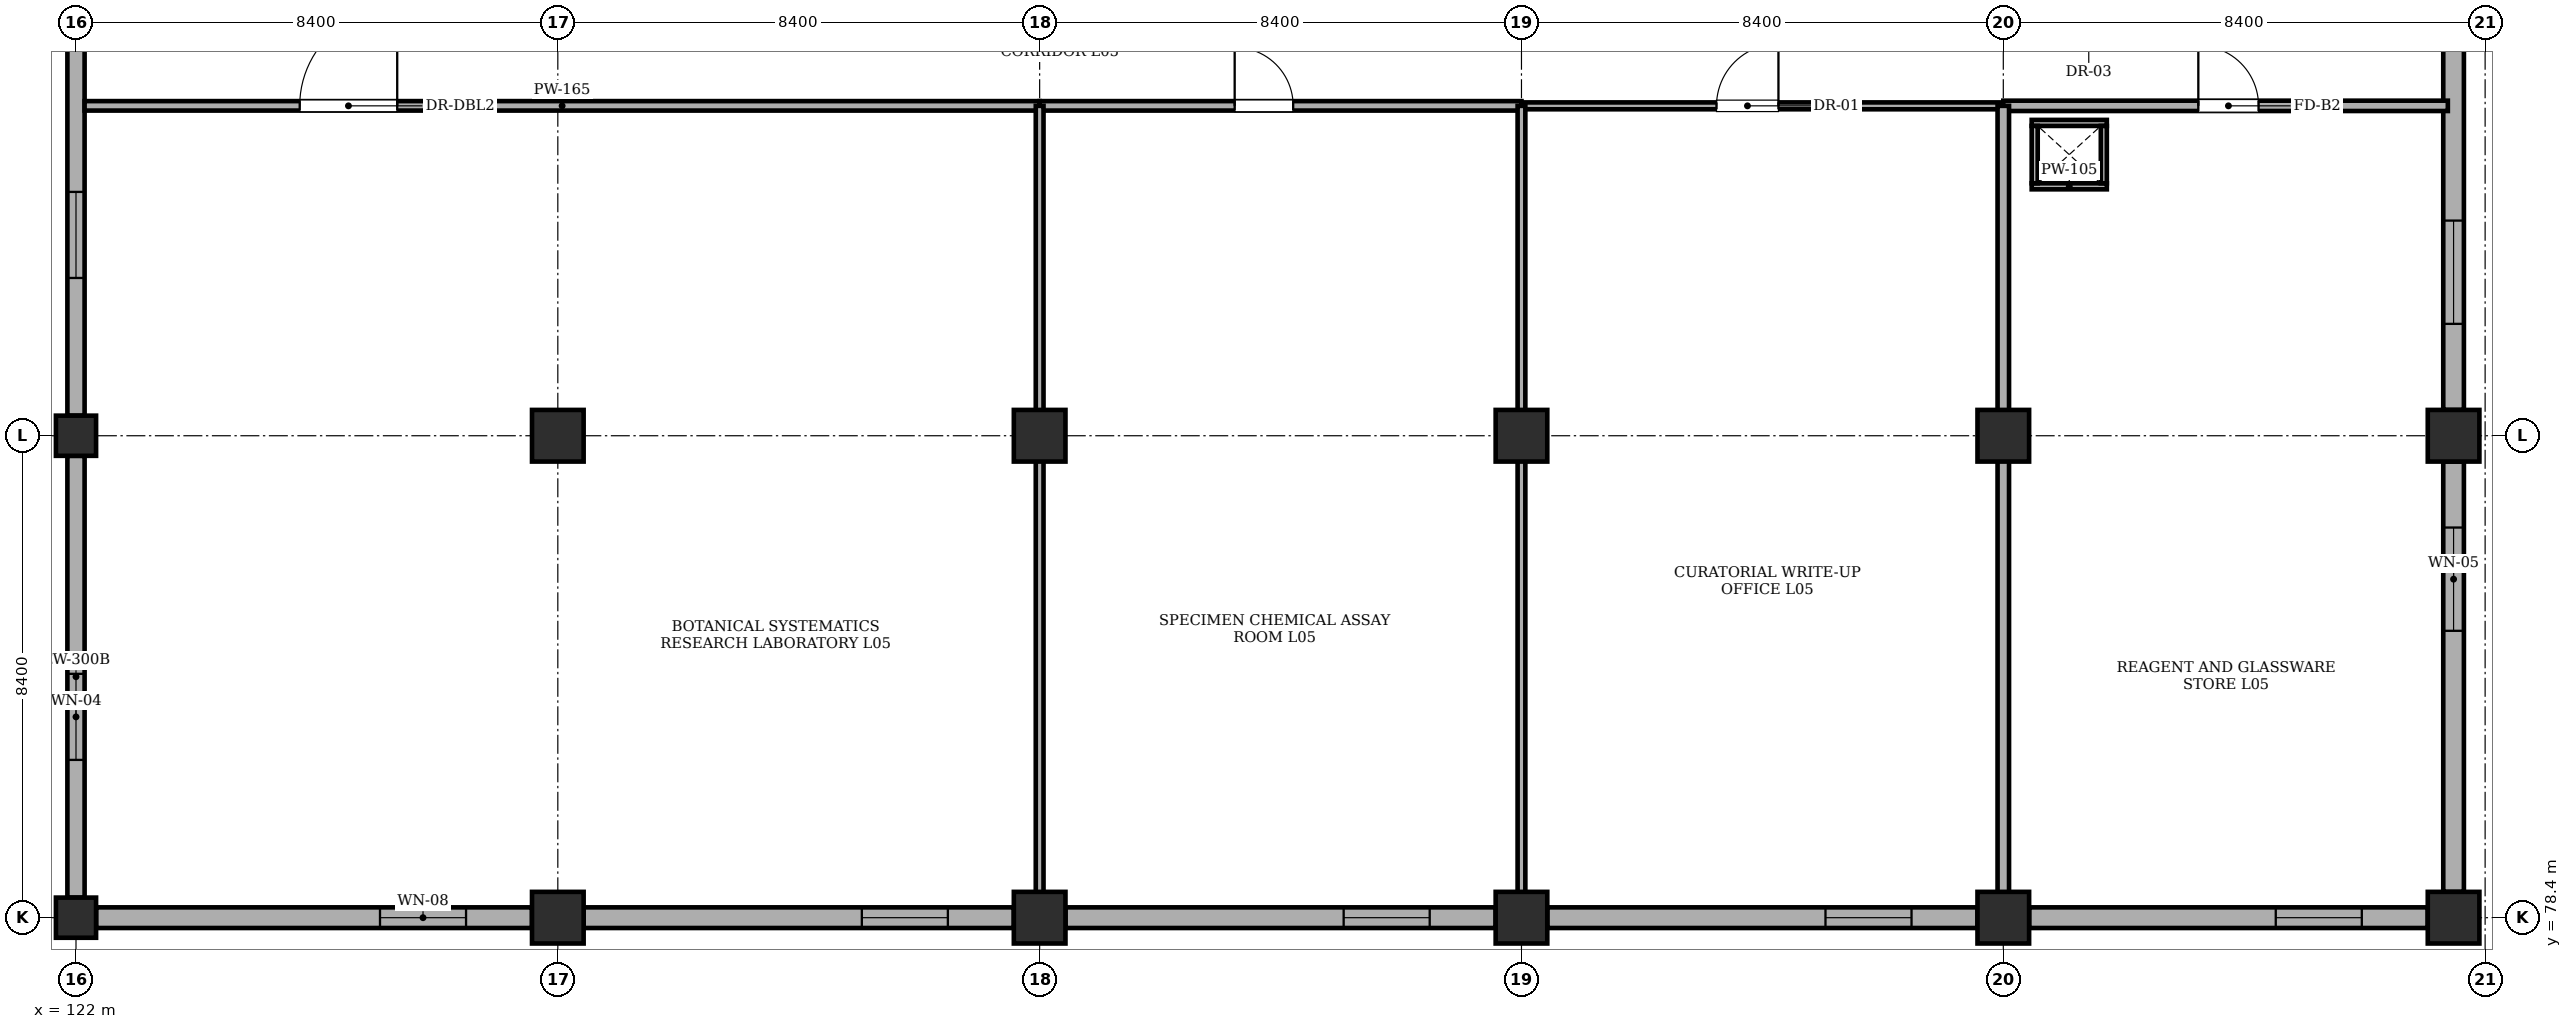
"""IFC4 building model, lengths in metres.
Left out: names, types, materials, properties, quantities, classifications, styles, units other than length and angle.
Written with IfcOpenShell. Run it as: python <this file> out.ifc"""

import sys

from ifc_helpers import new_model, si_unit, direction, frame, frame_2d, origin, origin_2d, place, context, subcontext, project, spatial, rectangle, extrude, element, fill, save


model = new_model("IFC4")
c1 = context("Model", 3, precision=1e-05, world=origin(), true_north=direction((0.0, 1.0)))
c2 = subcontext(c1, "Body", "Model", "MODEL_VIEW")
j1 = project(units=[si_unit("LENGTHUNIT", "METRE"), si_unit("PLANEANGLEUNIT", "RADIAN")], contexts=[c1])
p1 = place(None, origin())
s1 = spatial("IfcSite", under=j1, at=p1, CompositionType="ELEMENT")
p2 = place(p1, origin())
s2 = spatial("IfcBuilding", under=s1, at=p2, CompositionType="ELEMENT")
p3 = place(p2, frame((0.0, 0.0, 19.2)))
s3 = spatial("IfcBuildingStorey", under=s2, at=p3, CompositionType="ELEMENT", Elevation=19.2)
for number, where, z_axis, x_axis in (
    (1, (122.0, 78.4, 0.0), (0.0, 0.0, 1.0), (1.0, 0.0, 0.0)),
    (2, (122.0, 86.8, 0.0), (0.0, 0.0, 1.0), (1.0, 0.0, 0.0)),
):
    element("IfcColumn", number, at=place(p3, frame(where, z_axis=z_axis, x_axis=x_axis)), inside=s3, PredefinedType="COLUMN", context=c2, shape_type="SweptSolid", body=[
        extrude(rectangle(XDim=0.7, YDim=0.7, at=origin_2d()), origin(), (0.0, 0.0, 1.0), 4.02),
    ])
for number, where, z_axis, x_axis in (
    (3, (130.4, 78.4, 0.0), (0.0, 0.0, 1.0), (1.0, 0.0, 0.0)),
    (4, (130.4, 86.8, 0.0), (0.0, 0.0, 1.0), (1.0, 0.0, 0.0)),
    (5, (138.8, 78.4, 0.0), (0.0, 0.0, 1.0), (1.0, 0.0, 0.0)),
    (6, (138.8, 86.8, 0.0), (0.0, 0.0, 1.0), (1.0, 0.0, 0.0)),
    (7, (147.2, 78.4, 0.0), (0.0, 0.0, 1.0), (1.0, 0.0, 0.0)),
    (8, (147.2, 86.8, 0.0), (0.0, 0.0, 1.0), (1.0, 0.0, 0.0)),
    (9, (155.6, 78.4, 0.0), (0.0, 0.0, 1.0), (1.0, 0.0, 0.0)),
    (10, (155.6, 86.8, 0.0), (0.0, 0.0, 1.0), (1.0, 0.0, 0.0)),
    (11, (163.45, 78.4, 0.0), (0.0, 0.0, 1.0), (1.0, 0.0, 0.0)),
    (12, (163.45, 86.8, 0.0), (0.0, 0.0, 1.0), (1.0, 0.0, 0.0)),
):
    element("IfcColumn", number, at=place(p3, frame(where, z_axis=z_axis, x_axis=x_axis)), inside=s3, PredefinedType="COLUMN", context=c2, shape_type="SweptSolid", body=[
        extrude(rectangle(XDim=0.9, YDim=0.9, at=origin_2d()), origin(), (0.0, 0.0, 1.0), 4.02),
    ])
p4 = place(p3, frame((129.95, 78.4, 0.0), z_axis=(0.0, 0.0, 1.0), x_axis=(-1.0, 0.0, 0.0)))
e13 = element("IfcWall", 13, at=p4, inside=s3, PredefinedType="STANDARD", context=c2, shape_type="SweptSolid", body=[
    extrude(rectangle(XDim=7.6, YDim=0.36, at=frame_2d((3.8, 0.0))), origin(), (0.0, 0.0, 1.0), 3.32),
])
p5 = place(p4, frame((1.15, 0.0, 0.95)))
e14 = element("IfcOpeningElement", 14, at=p5, cuts=e13, PredefinedType="OPENING", context=c2, shape_type="SweptSolid", body=[
    extrude(rectangle(XDim=1.5, YDim=1.5, at=frame_2d((0.75, 0.75))), frame((0.0, 0.19, 0.0), z_axis=(0.0, -1.0, 0.0), x_axis=(1.0, 0.0, 0.0)), (0.0, 0.0, 1.0), 0.38),
])
p6 = place(p3, frame((138.35, 78.4, 0.0), z_axis=(0.0, 0.0, 1.0), x_axis=(-1.0, 0.0, 0.0)))
e15 = element("IfcWall", 15, at=p6, inside=s3, PredefinedType="STANDARD", context=c2, shape_type="SweptSolid", body=[
    extrude(rectangle(XDim=7.5, YDim=0.36, at=frame_2d((3.75, 0.0))), origin(), (0.0, 0.0, 1.0), 3.32),
])
p7 = place(p6, frame((1.15, 0.0, 0.95)))
e16 = element("IfcOpeningElement", 16, at=p7, cuts=e15, PredefinedType="OPENING", context=c2, shape_type="SweptSolid", body=[
    extrude(rectangle(XDim=1.5, YDim=1.5, at=frame_2d((0.75, 0.75))), frame((0.0, 0.19, 0.0), z_axis=(0.0, -1.0, 0.0), x_axis=(1.0, 0.0, 0.0)), (0.0, 0.0, 1.0), 0.38),
])
p8 = place(p3, frame((146.75, 78.4, 0.0), z_axis=(0.0, 0.0, 1.0), x_axis=(-1.0, 0.0, 0.0)))
e17 = element("IfcWall", 17, at=p8, inside=s3, PredefinedType="STANDARD", context=c2, shape_type="SweptSolid", body=[
    extrude(rectangle(XDim=7.5, YDim=0.36, at=frame_2d((3.75, 0.0))), origin(), (0.0, 0.0, 1.0), 3.32),
])
p9 = place(p8, frame((1.15, 0.0, 0.95)))
e18 = element("IfcOpeningElement", 18, at=p9, cuts=e17, PredefinedType="OPENING", context=c2, shape_type="SweptSolid", body=[
    extrude(rectangle(XDim=1.5, YDim=1.5, at=frame_2d((0.75, 0.75))), frame((0.0, 0.19, 0.0), z_axis=(0.0, -1.0, 0.0), x_axis=(1.0, 0.0, 0.0)), (0.0, 0.0, 1.0), 0.38),
])
p10 = place(p3, frame((155.15, 78.4, 0.0), z_axis=(0.0, 0.0, 1.0), x_axis=(-1.0, 0.0, 0.0)))
e19 = element("IfcWall", 19, at=p10, inside=s3, PredefinedType="STANDARD", context=c2, shape_type="SweptSolid", body=[
    extrude(rectangle(XDim=7.5, YDim=0.36, at=frame_2d((3.75, 0.0))), origin(), (0.0, 0.0, 1.0), 3.32),
])
p11 = place(p10, frame((1.15, 0.0, 0.95)))
e20 = element("IfcOpeningElement", 20, at=p11, cuts=e19, PredefinedType="OPENING", context=c2, shape_type="SweptSolid", body=[
    extrude(rectangle(XDim=1.5, YDim=1.5, at=frame_2d((0.75, 0.75))), frame((0.0, 0.19, 0.0), z_axis=(0.0, -1.0, 0.0), x_axis=(1.0, 0.0, 0.0)), (0.0, 0.0, 1.0), 0.38),
])
p12 = place(p3, frame((163.0, 78.4, 0.0), z_axis=(0.0, 0.0, 1.0), x_axis=(-1.0, 0.0, 0.0)))
e21 = element("IfcWall", 21, at=p12, inside=s3, PredefinedType="STANDARD", context=c2, shape_type="SweptSolid", body=[
    extrude(rectangle(XDim=6.95, YDim=0.36, at=frame_2d((3.475, 0.0))), origin(), (0.0, 0.0, 1.0), 3.32),
])
p13 = place(p12, frame((1.15, 0.0, 0.95)))
e22 = element("IfcOpeningElement", 22, at=p13, cuts=e21, PredefinedType="OPENING", context=c2, shape_type="SweptSolid", body=[
    extrude(rectangle(XDim=1.5, YDim=1.5, at=frame_2d((0.75, 0.75))), frame((0.0, 0.19, 0.0), z_axis=(0.0, -1.0, 0.0), x_axis=(1.0, 0.0, 0.0)), (0.0, 0.0, 1.0), 0.38),
])
p14 = place(p3, frame((163.45, 86.35, 0.0), z_axis=(0.0, 0.0, 1.0), x_axis=(0.0, -1.0, 0.0)))
e23 = element("IfcWall", 23, at=p14, inside=s3, PredefinedType="STANDARD", context=c2, shape_type="SweptSolid", body=[
    extrude(rectangle(XDim=7.5, YDim=0.36, at=frame_2d((3.75, 0.0))), origin(), (0.0, 0.0, 1.0), 3.32),
])
p15 = place(p14, frame((1.15, 0.0, 1.1)))
e24 = element("IfcOpeningElement", 24, at=p15, cuts=e23, PredefinedType="OPENING", context=c2, shape_type="SweptSolid", body=[
    extrude(rectangle(XDim=1.8, YDim=1.8, at=frame_2d((0.9, 0.9))), frame((0.0, 0.19, 0.0), z_axis=(0.0, -1.0, 0.0), x_axis=(1.0, 0.0, 0.0)), (0.0, 0.0, 1.0), 0.38),
])
p16 = place(p3, frame((163.45, 94.75, 0.0), z_axis=(0.0, 0.0, 1.0), x_axis=(0.0, -1.0, 0.0)))
e25 = element("IfcWall", 25, at=p16, inside=s3, PredefinedType="STANDARD", context=c2, shape_type="SweptSolid", body=[
    extrude(rectangle(XDim=7.5, YDim=0.36, at=frame_2d((3.75, 0.0))), origin(), (0.0, 0.0, 1.0), 3.32),
])
p17 = place(p16, frame((4.2, 0.0, 1.1)))
e26 = element("IfcOpeningElement", 26, at=p17, cuts=e25, PredefinedType="OPENING", context=c2, shape_type="SweptSolid", body=[
    extrude(rectangle(XDim=1.8, YDim=1.8, at=frame_2d((0.9, 0.9))), frame((0.0, 0.19, 0.0), z_axis=(0.0, -1.0, 0.0), x_axis=(1.0, 0.0, 0.0)), (0.0, 0.0, 1.0), 0.38),
])
p18 = place(p3, frame((122.0, 78.75, 0.0), z_axis=(0.0, 0.0, 1.0), x_axis=(0.0, 1.0, 0.0)))
e27 = element("IfcWall", 27, at=p18, inside=s3, PredefinedType="STANDARD", context=c2, shape_type="SweptSolid", body=[
    extrude(rectangle(XDim=7.7, YDim=0.3, at=frame_2d((3.85, 0.0))), origin(), (0.0, 0.0, 1.0), 3.32),
])
p19 = place(p18, frame((2.4, 0.0, 0.95)))
e28 = element("IfcOpeningElement", 28, at=p19, cuts=e27, PredefinedType="OPENING", context=c2, shape_type="SweptSolid", body=[
    extrude(rectangle(XDim=1.5, YDim=1.8, at=frame_2d((0.75, 0.9))), frame((0.0, 0.16, 0.0), z_axis=(0.0, -1.0, 0.0), x_axis=(1.0, 0.0, 0.0)), (0.0, 0.0, 1.0), 0.32),
])
p20 = place(p3, frame((122.0, 87.15, 0.0), z_axis=(0.0, 0.0, 1.0), x_axis=(0.0, 1.0, 0.0)))
e29 = element("IfcWall", 29, at=p20, inside=s3, PredefinedType="STANDARD", context=c2, shape_type="SweptSolid", body=[
    extrude(rectangle(XDim=7.7, YDim=0.3, at=frame_2d((3.85, 0.0))), origin(), (0.0, 0.0, 1.0), 3.32),
])
p21 = place(p20, frame((2.4, 0.0, 0.95)))
e30 = element("IfcOpeningElement", 30, at=p21, cuts=e29, PredefinedType="OPENING", context=c2, shape_type="SweptSolid", body=[
    extrude(rectangle(XDim=1.5, YDim=1.8, at=frame_2d((0.75, 0.9))), frame((0.0, 0.16, 0.0), z_axis=(0.0, -1.0, 0.0), x_axis=(1.0, 0.0, 0.0)), (0.0, 0.0, 1.0), 0.32),
])
p22 = place(p3, frame((122.15, 92.55, 0.0), z_axis=(0.0, 0.0, 1.0), x_axis=(1.0, 0.0, 0.0)))
e31 = element("IfcWall", 31, at=p22, inside=s3, PredefinedType="PARTITIONING", context=c2, shape_type="SweptSolid", body=[
    extrude(rectangle(XDim=16.65, YDim=0.165, at=frame_2d((8.325, 0.0))), origin(), (0.0, 0.0, 1.0), 4.02),
])
p23 = place(p22, frame((3.75, 0.0, 0.0)))
e32 = element("IfcOpeningElement", 32, at=p23, cuts=e31, PredefinedType="OPENING", context=c2, shape_type="SweptSolid", body=[
    extrude(rectangle(XDim=1.7, YDim=2.2, at=frame_2d((0.85, 1.1))), frame((0.0, 0.093, 0.0), z_axis=(0.0, -1.0, 0.0), x_axis=(1.0, 0.0, 0.0)), (0.0, 0.0, 1.0), 0.185),
])
p24 = place(p3, frame((138.8, 92.55, 0.0), z_axis=(0.0, 0.0, 1.0), x_axis=(1.0, 0.0, 0.0)))
e33 = element("IfcWall", 33, at=p24, inside=s3, PredefinedType="PARTITIONING", context=c2, shape_type="SweptSolid", body=[
    extrude(rectangle(XDim=8.4, YDim=0.165, at=frame_2d((4.2, 0.0))), origin(), (0.0, 0.0, 1.0), 4.02),
])
p25 = place(p24, frame((3.4, 0.0, 0.0)))
e34 = element("IfcOpeningElement", 34, at=p25, cuts=e33, PredefinedType="OPENING", context=c2, shape_type="SweptSolid", body=[
    extrude(rectangle(XDim=1.02, YDim=2.15, at=frame_2d((0.51, 1.075))), frame((0.0, 0.093, 0.0), z_axis=(0.0, -1.0, 0.0), x_axis=(1.0, 0.0, 0.0)), (0.0, 0.0, 1.0), 0.185),
])
p26 = place(p3, frame((138.8, 78.55, 0.0), z_axis=(0.0, 0.0, 1.0), x_axis=(0.0, 1.0, 0.0)))
e35 = element("IfcWall", 35, at=p26, inside=s3, PredefinedType="PARTITIONING", context=c2, shape_type="SweptSolid", body=[
    extrude(rectangle(XDim=14.0, YDim=0.135, at=frame_2d((7.0, 0.0))), origin(), (0.0, 0.0, 1.0), 3.32),
])
p27 = place(p3, frame((147.2, 92.55, 0.0), z_axis=(0.0, 0.0, 1.0), x_axis=(1.0, 0.0, 0.0)))
e36 = element("IfcWall", 36, at=p27, inside=s3, PredefinedType="PARTITIONING", context=c2, shape_type="SweptSolid", body=[
    extrude(rectangle(XDim=8.4, YDim=0.12, at=frame_2d((4.2, 0.0))), origin(), (0.0, 0.0, 1.0), 4.02),
])
p28 = place(p27, frame((3.4, 0.0, 0.0)))
e37 = element("IfcOpeningElement", 37, at=p28, cuts=e36, PredefinedType="OPENING", context=c2, shape_type="SweptSolid", body=[
    extrude(rectangle(XDim=1.08, YDim=2.15, at=frame_2d((0.54, 1.075))), frame((0.0, 0.07, 0.0), z_axis=(0.0, -1.0, 0.0), x_axis=(1.0, 0.0, 0.0)), (0.0, 0.0, 1.0), 0.14),
])
p29 = place(p3, frame((147.2, 78.55, 0.0), z_axis=(0.0, 0.0, 1.0), x_axis=(0.0, 1.0, 0.0)))
e38 = element("IfcWall", 38, at=p29, inside=s3, PredefinedType="PARTITIONING", context=c2, shape_type="SweptSolid", body=[
    extrude(rectangle(XDim=14.0, YDim=0.135, at=frame_2d((7.0, 0.0))), origin(), (0.0, 0.0, 1.0), 3.32),
])
p30 = place(p3, frame((155.6, 92.55, 0.0), z_axis=(0.0, 0.0, 1.0), x_axis=(1.0, 0.0, 0.0)))
e39 = element("IfcWall", 39, at=p30, inside=s3, PredefinedType="STANDARD", context=c2, shape_type="SweptSolid", body=[
    extrude(rectangle(XDim=7.75, YDim=0.18, at=frame_2d((3.875, 0.0))), origin(), (0.0, 0.0, 1.0), 4.02),
])
p31 = place(p30, frame((3.4, 0.0, 0.0)))
e40 = element("IfcOpeningElement", 40, at=p31, cuts=e39, PredefinedType="OPENING", context=c2, shape_type="SweptSolid", body=[
    extrude(rectangle(XDim=1.05, YDim=2.15, at=frame_2d((0.525, 1.075))), frame((0.0, 0.1, 0.0), z_axis=(0.0, -1.0, 0.0), x_axis=(1.0, 0.0, 0.0)), (0.0, 0.0, 1.0), 0.2),
])
p32 = place(p3, frame((155.6, 78.55, 0.0), z_axis=(0.0, 0.0, 1.0), x_axis=(0.0, 1.0, 0.0)))
e41 = element("IfcWall", 41, at=p32, inside=s3, PredefinedType="SOLIDWALL", context=c2, shape_type="SweptSolid", body=[
    extrude(rectangle(XDim=14.0, YDim=0.2, at=frame_2d((7.0, 0.0))), origin(), (0.0, 0.0, 1.0), 3.32),
])
for number, where, z_axis, x_axis in (
    (42, (156.095, 91.147, 0.0), (0.0, 0.0, 1.0), (1.0, 0.0, 0.0)),
    (43, (156.095, 92.252, 0.0), (0.0, 0.0, 1.0), (1.0, 0.0, 0.0)),
):
    element("IfcWall", number, at=place(p3, frame(where, z_axis=z_axis, x_axis=x_axis)), inside=s3, PredefinedType="PARTITIONING", context=c2, shape_type="SweptSolid", body=[
        extrude(rectangle(XDim=1.31, YDim=0.105, at=frame_2d((0.655, 0.0))), origin(), (0.0, 0.0, 1.0), 4.02),
    ])
for number, where, z_axis, x_axis in (
    (44, (156.147, 91.2, 0.0), (0.0, 0.0, 1.0), (0.0, 1.0, 0.0)),
    (45, (157.353, 91.2, 0.0), (0.0, 0.0, 1.0), (0.0, 1.0, 0.0)),
):
    element("IfcWall", number, at=place(p3, frame(where, z_axis=z_axis, x_axis=x_axis)), inside=s3, PredefinedType="PARTITIONING", context=c2, shape_type="SweptSolid", body=[
        extrude(rectangle(XDim=1.0, YDim=0.105, at=frame_2d((0.5, 0.0))), origin(), (0.0, 0.0, 1.0), 4.02),
    ])
p33 = place(p5, origin())
e46 = element("IfcWindow", 46, at=p33, inside=s3, PartitioningType="DOUBLE_PANEL_VERTICAL", PredefinedType="WINDOW", context=c2, shape_type="SweptSolid", body=[
    extrude(rectangle(XDim=1.5, YDim=1.5, at=frame_2d((0.75, 0.75))), frame((0.0, 0.03, 0.0), z_axis=(0.0, -1.0, 0.0), x_axis=(1.0, 0.0, 0.0)), (0.0, 0.0, 1.0), 0.06),
])
fill(e14, e46)
p34 = place(p7, origin())
e47 = element("IfcWindow", 47, at=p34, inside=s3, PartitioningType="DOUBLE_PANEL_VERTICAL", PredefinedType="WINDOW", context=c2, shape_type="SweptSolid", body=[
    extrude(rectangle(XDim=1.5, YDim=1.5, at=frame_2d((0.75, 0.75))), frame((0.0, 0.03, 0.0), z_axis=(0.0, -1.0, 0.0), x_axis=(1.0, 0.0, 0.0)), (0.0, 0.0, 1.0), 0.06),
])
fill(e16, e47)
p35 = place(p9, origin())
e48 = element("IfcWindow", 48, at=p35, inside=s3, PartitioningType="DOUBLE_PANEL_VERTICAL", PredefinedType="WINDOW", context=c2, shape_type="SweptSolid", body=[
    extrude(rectangle(XDim=1.5, YDim=1.5, at=frame_2d((0.75, 0.75))), frame((0.0, 0.03, 0.0), z_axis=(0.0, -1.0, 0.0), x_axis=(1.0, 0.0, 0.0)), (0.0, 0.0, 1.0), 0.06),
])
fill(e18, e48)
p36 = place(p11, origin())
e49 = element("IfcWindow", 49, at=p36, inside=s3, PartitioningType="DOUBLE_PANEL_VERTICAL", PredefinedType="WINDOW", context=c2, shape_type="SweptSolid", body=[
    extrude(rectangle(XDim=1.5, YDim=1.5, at=frame_2d((0.75, 0.75))), frame((0.0, 0.03, 0.0), z_axis=(0.0, -1.0, 0.0), x_axis=(1.0, 0.0, 0.0)), (0.0, 0.0, 1.0), 0.06),
])
fill(e20, e49)
p37 = place(p13, origin())
e50 = element("IfcWindow", 50, at=p37, inside=s3, PartitioningType="DOUBLE_PANEL_VERTICAL", PredefinedType="WINDOW", context=c2, shape_type="SweptSolid", body=[
    extrude(rectangle(XDim=1.5, YDim=1.5, at=frame_2d((0.75, 0.75))), frame((0.0, 0.03, 0.0), z_axis=(0.0, -1.0, 0.0), x_axis=(1.0, 0.0, 0.0)), (0.0, 0.0, 1.0), 0.06),
])
fill(e22, e50)
p38 = place(p15, origin())
e51 = element("IfcWindow", 51, at=p38, inside=s3, PartitioningType="DOUBLE_PANEL_VERTICAL", PredefinedType="WINDOW", context=c2, shape_type="SweptSolid", body=[
    extrude(rectangle(XDim=1.8, YDim=1.8, at=frame_2d((0.9, 0.9))), frame((0.0, 0.03, 0.0), z_axis=(0.0, -1.0, 0.0), x_axis=(1.0, 0.0, 0.0)), (0.0, 0.0, 1.0), 0.06),
])
fill(e24, e51)
p39 = place(p17, origin())
e52 = element("IfcWindow", 52, at=p39, inside=s3, PartitioningType="DOUBLE_PANEL_VERTICAL", PredefinedType="WINDOW", context=c2, shape_type="SweptSolid", body=[
    extrude(rectangle(XDim=1.8, YDim=1.8, at=frame_2d((0.9, 0.9))), frame((0.0, 0.03, 0.0), z_axis=(0.0, -1.0, 0.0), x_axis=(1.0, 0.0, 0.0)), (0.0, 0.0, 1.0), 0.06),
])
fill(e26, e52)
p40 = place(p19, origin())
e53 = element("IfcWindow", 53, at=p40, inside=s3, PartitioningType="DOUBLE_PANEL_VERTICAL", PredefinedType="WINDOW", context=c2, shape_type="SweptSolid", body=[
    extrude(rectangle(XDim=1.5, YDim=1.8, at=frame_2d((0.75, 0.9))), frame((0.0, 0.03, 0.0), z_axis=(0.0, -1.0, 0.0), x_axis=(1.0, 0.0, 0.0)), (0.0, 0.0, 1.0), 0.06),
])
fill(e28, e53)
p41 = place(p21, origin())
e54 = element("IfcWindow", 54, at=p41, inside=s3, PartitioningType="DOUBLE_PANEL_VERTICAL", PredefinedType="WINDOW", context=c2, shape_type="SweptSolid", body=[
    extrude(rectangle(XDim=1.5, YDim=1.8, at=frame_2d((0.75, 0.9))), frame((0.0, 0.03, 0.0), z_axis=(0.0, -1.0, 0.0), x_axis=(1.0, 0.0, 0.0)), (0.0, 0.0, 1.0), 0.06),
])
fill(e30, e54)
p42 = place(p23, origin())
e55 = element("IfcDoor", 55, at=p42, inside=s3, OperationType="SINGLE_SWING_RIGHT", PredefinedType="DOOR", context=c2, shape_type="SweptSolid", body=[
    extrude(rectangle(XDim=1.7, YDim=2.2, at=frame_2d((0.85, 1.1))), frame((0.0, 0.025, 0.0), z_axis=(0.0, -1.0, 0.0), x_axis=(1.0, 0.0, 0.0)), (0.0, 0.0, 1.0), 0.05),
])
fill(e32, e55)
p43 = place(p25, origin())
e56 = element("IfcDoor", 56, at=p43, inside=s3, OperationType="SINGLE_SWING_LEFT", PredefinedType="DOOR", context=c2, shape_type="SweptSolid", body=[
    extrude(rectangle(XDim=1.02, YDim=2.15, at=frame_2d((0.51, 1.075))), frame((0.0, 0.025, 0.0), z_axis=(0.0, -1.0, 0.0), x_axis=(1.0, 0.0, 0.0)), (0.0, 0.0, 1.0), 0.05),
])
fill(e34, e56)
p44 = place(p28, origin())
e57 = element("IfcDoor", 57, at=p44, inside=s3, OperationType="SINGLE_SWING_RIGHT", PredefinedType="DOOR", context=c2, shape_type="SweptSolid", body=[
    extrude(rectangle(XDim=1.08, YDim=2.15, at=frame_2d((0.54, 1.075))), frame((0.0, 0.025, 0.0), z_axis=(0.0, -1.0, 0.0), x_axis=(1.0, 0.0, 0.0)), (0.0, 0.0, 1.0), 0.05),
])
fill(e37, e57)
p45 = place(p31, origin())
e58 = element("IfcDoor", 58, at=p45, inside=s3, OperationType="SINGLE_SWING_LEFT", PredefinedType="DOOR", context=c2, shape_type="SweptSolid", body=[
    extrude(rectangle(XDim=1.05, YDim=2.15, at=frame_2d((0.525, 1.075))), frame((0.0, 0.025, 0.0), z_axis=(0.0, -1.0, 0.0), x_axis=(1.0, 0.0, 0.0)), (0.0, 0.0, 1.0), 0.05),
])
fill(e40, e58)
save(model, sys.argv[1])
